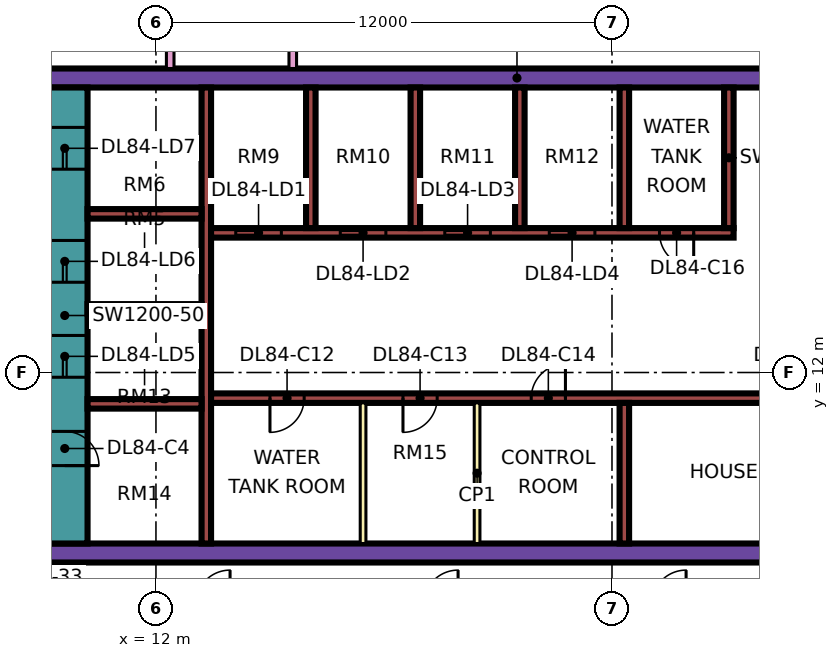
"""IFC4 building model, lengths in metres.
Left out: names, types, materials, properties, quantities, classifications, styles, units other than length and angle.
Written with IfcOpenShell. Run it as: python <this file> out.ifc"""

import sys

from ifc_helpers import new_model, si_unit, direction, frame, frame_2d, origin, place, context, subcontext, project, spatial, rectangle, extrude, element, fill, save


model = new_model("IFC4")
c1 = context("Model", 3, precision=1e-05, world=origin(), true_north=direction((0.0, 1.0)))
c2 = subcontext(c1, "Body", "Model", "MODEL_VIEW")
j1 = project(units=[si_unit("LENGTHUNIT", "METRE"), si_unit("PLANEANGLEUNIT", "RADIAN")], contexts=[c1])
p1 = place(None, origin())
s1 = spatial("IfcSite", under=j1, at=p1, CompositionType="ELEMENT")
p2 = place(p1, origin())
s2 = spatial("IfcBuilding", under=s1, at=p2, CompositionType="ELEMENT")
p3 = place(p2, frame((0.0, 0.0, 361.4)))
s3 = spatial("IfcBuildingStorey", under=s2, at=p3, CompositionType="ELEMENT", Elevation=361.4)
p4 = place(p3, frame((9.0, 7.25, 0.0), z_axis=(0.0, 0.0, 1.0), x_axis=(1.0, 0.0, 0.0)))
e1 = element("IfcWall", 1, at=p4, inside=s3, PredefinedType="SHEAR", context=c2, shape_type="SweptSolid", body=[
    extrude(rectangle(XDim=25.0, YDim=0.5, at=frame_2d((12.5, 0.0))), origin(), (0.0, 0.0, 1.0), 3.75),
])
p5 = place(p3, frame((9.0, 19.75, 0.0), z_axis=(0.0, 0.0, 1.0), x_axis=(1.0, 0.0, 0.0)))
e2 = element("IfcWall", 2, at=p5, inside=s3, PredefinedType="SHEAR", context=c2, shape_type="SweptSolid", body=[
    extrude(rectangle(XDim=25.0, YDim=0.5, at=frame_2d((12.5, 0.0))), origin(), (0.0, 0.0, 1.0), 3.75),
])
p6 = place(p5, frame((19.1, 0.0, 0.0)))
e3 = element("IfcOpeningElement", 3, at=p6, cuts=e2, PredefinedType="OPENING", context=c2, shape_type="SweptSolid", body=[
    extrude(rectangle(XDim=1.8, YDim=2.4, at=frame_2d((0.9, 1.2))), frame((0.0, 0.26, 0.0), z_axis=(0.0, -1.0, 0.0), x_axis=(1.0, 0.0, 0.0)), (0.0, 0.0, 1.0), 0.52),
])
p7 = place(p3, frame((9.6, 7.5, 0.0), z_axis=(0.0, 0.0, 1.0), x_axis=(0.0, 1.0, 0.0)))
e4 = element("IfcWall", 4, at=p7, inside=s3, PredefinedType="SHEAR", context=c2, shape_type="SweptSolid", body=[
    extrude(rectangle(XDim=12.0, YDim=1.2, at=frame_2d((6.0, 0.0))), origin(), (0.0, 0.0, 1.0), 3.75),
])
p8 = place(p7, frame((4.375, 0.0, 0.0)))
e5 = element("IfcOpeningElement", 5, at=p8, cuts=e4, PredefinedType="OPENING", context=c2, shape_type="SweptSolid", body=[
    extrude(rectangle(XDim=1.1, YDim=2.2, at=frame_2d((0.55, 1.1))), frame((0.0, 0.61, 0.0), z_axis=(0.0, -1.0, 0.0), x_axis=(1.0, 0.0, 0.0)), (0.0, 0.0, 1.0), 1.22),
])
p9 = place(p7, frame((6.875, 0.0, 0.0)))
e6 = element("IfcOpeningElement", 6, at=p9, cuts=e4, PredefinedType="OPENING", context=c2, shape_type="SweptSolid", body=[
    extrude(rectangle(XDim=1.1, YDim=2.2, at=frame_2d((0.55, 1.1))), frame((0.0, 0.61, 0.0), z_axis=(0.0, -1.0, 0.0), x_axis=(1.0, 0.0, 0.0)), (0.0, 0.0, 1.0), 1.22),
])
p10 = place(p7, frame((9.85, 0.0, 0.0)))
e7 = element("IfcOpeningElement", 7, at=p10, cuts=e4, PredefinedType="OPENING", context=c2, shape_type="SweptSolid", body=[
    extrude(rectangle(XDim=1.1, YDim=2.2, at=frame_2d((0.55, 1.1))), frame((0.0, 0.61, 0.0), z_axis=(0.0, -1.0, 0.0), x_axis=(1.0, 0.0, 0.0)), (0.0, 0.0, 1.0), 1.22),
])
p11 = place(p7, frame((2.05, 0.0, 0.0)))
e8 = element("IfcOpeningElement", 8, at=p11, cuts=e4, PredefinedType="OPENING", context=c2, shape_type="SweptSolid", body=[
    extrude(rectangle(XDim=0.9, YDim=2.1, at=frame_2d((0.45, 1.05))), frame((0.0, 0.61, 0.0), z_axis=(0.0, -1.0, 0.0), x_axis=(1.0, 0.0, 0.0)), (0.0, 0.0, 1.0), 1.22),
])
p12 = place(p3, frame((13.325, 7.5, 0.0), z_axis=(0.0, 0.0, 1.0), x_axis=(0.0, 1.0, 0.0)))
e9 = element("IfcWall", 9, at=p12, inside=s3, PredefinedType="SHEAR", context=c2, shape_type="SweptSolid", body=[
    extrude(rectangle(XDim=12.0, YDim=0.25, at=frame_2d((6.0, 0.0))), origin(), (0.0, 0.0, 1.0), 3.75),
])
p13 = place(p3, frame((13.45, 11.325, 0.0), z_axis=(0.0, 0.0, 1.0), x_axis=(1.0, 0.0, 0.0)))
e10 = element("IfcWall", 10, at=p13, inside=s3, PredefinedType="SHEAR", context=c2, shape_type="SweptSolid", body=[
    extrude(rectangle(XDim=20.05, YDim=0.25, at=frame_2d((10.025, 0.0))), origin(), (0.0, 0.0, 1.0), 3.75),
])
p14 = place(p13, frame((1.55, 0.0, 0.0)))
e11 = element("IfcOpeningElement", 11, at=p14, cuts=e10, PredefinedType="OPENING", context=c2, shape_type="SweptSolid", body=[
    extrude(rectangle(XDim=0.9, YDim=2.1, at=frame_2d((0.45, 1.05))), frame((0.0, 0.135, 0.0), z_axis=(0.0, -1.0, 0.0), x_axis=(1.0, 0.0, 0.0)), (0.0, 0.0, 1.0), 0.27),
])
p15 = place(p13, frame((5.05, 0.0, 0.0)))
e12 = element("IfcOpeningElement", 12, at=p15, cuts=e10, PredefinedType="OPENING", context=c2, shape_type="SweptSolid", body=[
    extrude(rectangle(XDim=0.9, YDim=2.1, at=frame_2d((0.45, 1.05))), frame((0.0, 0.135, 0.0), z_axis=(0.0, -1.0, 0.0), x_axis=(1.0, 0.0, 0.0)), (0.0, 0.0, 1.0), 0.27),
])
p16 = place(p13, frame((8.425, 0.0, 0.0)))
e13 = element("IfcOpeningElement", 13, at=p16, cuts=e10, PredefinedType="OPENING", context=c2, shape_type="SweptSolid", body=[
    extrude(rectangle(XDim=0.9, YDim=2.1, at=frame_2d((0.45, 1.05))), frame((0.0, 0.135, 0.0), z_axis=(0.0, -1.0, 0.0), x_axis=(1.0, 0.0, 0.0)), (0.0, 0.0, 1.0), 0.27),
])
p17 = place(p13, frame((15.075, 0.0, 0.0)))
e14 = element("IfcOpeningElement", 14, at=p17, cuts=e10, PredefinedType="OPENING", context=c2, shape_type="SweptSolid", body=[
    extrude(rectangle(XDim=0.9, YDim=2.1, at=frame_2d((0.45, 1.05))), frame((0.0, 0.135, 0.0), z_axis=(0.0, -1.0, 0.0), x_axis=(1.0, 0.0, 0.0)), (0.0, 0.0, 1.0), 0.27),
])
p18 = place(p3, frame((13.45, 15.675, 0.0), z_axis=(0.0, 0.0, 1.0), x_axis=(1.0, 0.0, 0.0)))
e15 = element("IfcWall", 15, at=p18, inside=s3, PredefinedType="SHEAR", context=c2, shape_type="SweptSolid", body=[
    extrude(rectangle(XDim=13.75, YDim=0.25, at=frame_2d((6.875, 0.0))), origin(), (0.0, 0.0, 1.0), 3.75),
])
p19 = place(p18, frame((0.65, 0.0, 0.0)))
e16 = element("IfcOpeningElement", 16, at=p19, cuts=e15, PredefinedType="OPENING", context=c2, shape_type="SweptSolid", body=[
    extrude(rectangle(XDim=1.2, YDim=2.2, at=frame_2d((0.6, 1.1))), frame((0.0, 0.135, 0.0), z_axis=(0.0, -1.0, 0.0), x_axis=(1.0, 0.0, 0.0)), (0.0, 0.0, 1.0), 0.27),
])
p20 = place(p18, frame((3.4, 0.0, 0.0)))
e17 = element("IfcOpeningElement", 17, at=p20, cuts=e15, PredefinedType="OPENING", context=c2, shape_type="SweptSolid", body=[
    extrude(rectangle(XDim=1.2, YDim=2.2, at=frame_2d((0.6, 1.1))), frame((0.0, 0.135, 0.0), z_axis=(0.0, -1.0, 0.0), x_axis=(1.0, 0.0, 0.0)), (0.0, 0.0, 1.0), 0.27),
])
p21 = place(p18, frame((6.15, 0.0, 0.0)))
e18 = element("IfcOpeningElement", 18, at=p21, cuts=e15, PredefinedType="OPENING", context=c2, shape_type="SweptSolid", body=[
    extrude(rectangle(XDim=1.2, YDim=2.2, at=frame_2d((0.6, 1.1))), frame((0.0, 0.135, 0.0), z_axis=(0.0, -1.0, 0.0), x_axis=(1.0, 0.0, 0.0)), (0.0, 0.0, 1.0), 0.27),
])
p22 = place(p18, frame((8.9, 0.0, 0.0)))
e19 = element("IfcOpeningElement", 19, at=p22, cuts=e15, PredefinedType="OPENING", context=c2, shape_type="SweptSolid", body=[
    extrude(rectangle(XDim=1.2, YDim=2.2, at=frame_2d((0.6, 1.1))), frame((0.0, 0.135, 0.0), z_axis=(0.0, -1.0, 0.0), x_axis=(1.0, 0.0, 0.0)), (0.0, 0.0, 1.0), 0.27),
])
p23 = place(p18, frame((11.8, 0.0, 0.0)))
e20 = element("IfcOpeningElement", 20, at=p23, cuts=e15, PredefinedType="OPENING", context=c2, shape_type="SweptSolid", body=[
    extrude(rectangle(XDim=0.9, YDim=2.1, at=frame_2d((0.45, 1.05))), frame((0.0, 0.135, 0.0), z_axis=(0.0, -1.0, 0.0), x_axis=(1.0, 0.0, 0.0)), (0.0, 0.0, 1.0), 0.27),
])
for number, where, z_axis, x_axis in (
    (21, (10.2, 11.175, 0.0), (0.0, 0.0, 1.0), (1.0, 0.0, 0.0)),
    (22, (10.2, 13.675, 0.0), (0.0, 0.0, 1.0), (1.0, 0.0, 0.0)),
    (23, (10.2, 16.175, 0.0), (0.0, 0.0, 1.0), (1.0, 0.0, 0.0)),
):
    element("IfcWall", number, at=place(p3, frame(where, z_axis=z_axis, x_axis=x_axis)), inside=s3, PredefinedType="SHEAR", context=c2, shape_type="SweptSolid", body=[
        extrude(rectangle(XDim=3.0, YDim=0.25, at=frame_2d((1.5, 0.0))), origin(), (0.0, 0.0, 1.0), 3.75),
    ])
for number, where, z_axis, x_axis in (
    (24, (24.325, 7.5, 0.0), (0.0, 0.0, 1.0), (0.0, 1.0, 0.0)),
    (25, (16.075, 15.8, 0.0), (0.0, 0.0, 1.0), (0.0, 1.0, 0.0)),
    (26, (18.825, 15.8, 0.0), (0.0, 0.0, 1.0), (0.0, 1.0, 0.0)),
    (27, (21.575, 15.8, 0.0), (0.0, 0.0, 1.0), (0.0, 1.0, 0.0)),
    (28, (24.325, 15.8, 0.0), (0.0, 0.0, 1.0), (0.0, 1.0, 0.0)),
    (29, (27.075, 15.8, 0.0), (0.0, 0.0, 1.0), (0.0, 1.0, 0.0)),
):
    element("IfcWall", number, at=place(p3, frame(where, z_axis=z_axis, x_axis=x_axis)), inside=s3, PredefinedType="SHEAR", context=c2, shape_type="SweptSolid", body=[
        extrude(rectangle(XDim=3.7, YDim=0.25, at=frame_2d((1.85, 0.0))), origin(), (0.0, 0.0, 1.0), 3.75),
    ])
p24 = place(p3, frame((-1.447, 12.553, 0.0), z_axis=(0.0, 0.0, 1.0), x_axis=(0.707106781187, -0.707106781187, 0.0)))
e30 = element("IfcWall", 30, at=p24, inside=s3, PredefinedType="SOLIDWALL", context=c2, shape_type="SweptSolid", body=[
    extrude(rectangle(XDim=19.799, YDim=0.15, at=frame_2d((9.899, 0.0))), origin(), (0.0, 0.0, 1.0), 3.35),
])
p25 = place(p24, frame((2.212, 0.0, 0.45)))
e31 = element("IfcOpeningElement", 31, at=p25, cuts=e30, PredefinedType="OPENING", context=c2, shape_type="SweptSolid", body=[
    extrude(rectangle(XDim=3.0, YDim=2.4, at=frame_2d((1.5, 1.2))), frame((0.0, 0.085, 0.0), z_axis=(0.0, -1.0, 0.0), x_axis=(1.0, 0.0, 0.0)), (0.0, 0.0, 1.0), 0.17),
])
p26 = place(p24, frame((10.216, 0.0, 0.45)))
e32 = element("IfcOpeningElement", 32, at=p26, cuts=e30, PredefinedType="OPENING", context=c2, shape_type="SweptSolid", body=[
    extrude(rectangle(XDim=3.0, YDim=2.4, at=frame_2d((1.5, 1.2))), frame((0.0, 0.085, 0.0), z_axis=(0.0, -1.0, 0.0), x_axis=(1.0, 0.0, 0.0)), (0.0, 0.0, 1.0), 0.17),
])
for number, where, z_axis, x_axis in (
    (33, (17.45, 7.5, 0.0), (0.0, 0.0, 1.0), (0.0, 1.0, 0.0)),
    (34, (20.45, 7.5, 0.0), (0.0, 0.0, 1.0), (0.0, 1.0, 0.0)),
):
    element("IfcWall", number, at=place(p3, frame(where, z_axis=z_axis, x_axis=x_axis)), inside=s3, PredefinedType="PARTITIONING", context=c2, shape_type="SweptSolid", body=[
        extrude(rectangle(XDim=3.7, YDim=0.15, at=frame_2d((1.85, 0.0))), origin(), (0.0, 0.0, 1.0), 3.35),
    ])
p27 = place(p3, frame((12.375, 20.0, 0.0), z_axis=(0.0, 0.0, 1.0), x_axis=(0.0, 1.0, 0.0)))
e35 = element("IfcWall", 35, at=p27, inside=s3, PredefinedType="PARTITIONING", context=c2, shape_type="SweptSolid", body=[
    extrude(rectangle(XDim=33.926, YDim=0.2, at=frame_2d((16.963, 0.0))), origin(), (0.0, 0.0, 1.0), 3.35),
])
p28 = place(p27, frame((29.4, 0.0, 0.0)))
e36 = element("IfcOpeningElement", 36, at=p28, cuts=e35, PredefinedType="OPENING", context=c2, shape_type="SweptSolid", body=[
    extrude(rectangle(XDim=1.0, YDim=2.1, at=frame_2d((0.5, 1.05))), frame((0.0, 0.11, 0.0), z_axis=(0.0, -1.0, 0.0), x_axis=(1.0, 0.0, 0.0)), (0.0, 0.0, 1.0), 0.22),
])
p29 = place(p27, frame((0.6, 0.0, 0.0)))
e37 = element("IfcOpeningElement", 37, at=p29, cuts=e35, PredefinedType="OPENING", context=c2, shape_type="SweptSolid", body=[
    extrude(rectangle(XDim=1.2, YDim=2.1, at=frame_2d((0.6, 1.05))), frame((0.0, 0.11, 0.0), z_axis=(0.0, -1.0, 0.0), x_axis=(1.0, 0.0, 0.0)), (0.0, 0.0, 1.0), 0.22),
])
p30 = place(p27, frame((4.5, 0.0, 0.0)))
e38 = element("IfcOpeningElement", 38, at=p30, cuts=e35, PredefinedType="OPENING", context=c2, shape_type="SweptSolid", body=[
    extrude(rectangle(XDim=1.0, YDim=2.1, at=frame_2d((0.5, 1.05))), frame((0.0, 0.11, 0.0), z_axis=(0.0, -1.0, 0.0), x_axis=(1.0, 0.0, 0.0)), (0.0, 0.0, 1.0), 0.22),
])
p31 = place(p3, frame((15.6, 20.0, 0.0), z_axis=(0.0, 0.0, 1.0), x_axis=(0.0, 1.0, 0.0)))
e39 = element("IfcWall", 39, at=p31, inside=s3, PredefinedType="PARTITIONING", context=c2, shape_type="SweptSolid", body=[
    extrude(rectangle(XDim=27.775, YDim=0.2, at=frame_2d((13.887, 0.0))), origin(), (0.0, 0.0, 1.0), 3.35),
])
p32 = place(p31, frame((7.15, 0.0, 0.0)))
e40 = element("IfcOpeningElement", 40, at=p32, cuts=e39, PredefinedType="OPENING", context=c2, shape_type="SweptSolid", body=[
    extrude(rectangle(XDim=1.6, YDim=2.1, at=frame_2d((0.8, 1.05))), frame((0.0, 0.11, 0.0), z_axis=(0.0, -1.0, 0.0), x_axis=(1.0, 0.0, 0.0)), (0.0, 0.0, 1.0), 0.22),
])
p33 = place(p31, frame((13.5, 0.0, 0.0)))
e41 = element("IfcOpeningElement", 41, at=p33, cuts=e39, PredefinedType="OPENING", context=c2, shape_type="SweptSolid", body=[
    extrude(rectangle(XDim=1.0, YDim=2.1, at=frame_2d((0.5, 1.05))), frame((0.0, 0.11, 0.0), z_axis=(0.0, -1.0, 0.0), x_axis=(1.0, 0.0, 0.0)), (0.0, 0.0, 1.0), 0.22),
])
p34 = place(p31, frame((17.05, 0.0, 0.0)))
e42 = element("IfcOpeningElement", 42, at=p34, cuts=e39, PredefinedType="OPENING", context=c2, shape_type="SweptSolid", body=[
    extrude(rectangle(XDim=1.0, YDim=2.1, at=frame_2d((0.5, 1.05))), frame((0.0, 0.11, 0.0), z_axis=(0.0, -1.0, 0.0), x_axis=(1.0, 0.0, 0.0)), (0.0, 0.0, 1.0), 0.22),
])
p35 = place(p31, frame((1.15, 0.0, 0.0)))
e43 = element("IfcOpeningElement", 43, at=p35, cuts=e39, PredefinedType="OPENING", context=c2, shape_type="SweptSolid", body=[
    extrude(rectangle(XDim=1.8, YDim=2.1, at=frame_2d((0.9, 1.05))), frame((0.0, 0.11, 0.0), z_axis=(0.0, -1.0, 0.0), x_axis=(1.0, 0.0, 0.0)), (0.0, 0.0, 1.0), 0.22),
])
p36 = place(p31, frame((25.9, 0.0, 0.0)))
e44 = element("IfcOpeningElement", 44, at=p36, cuts=e39, PredefinedType="OPENING", context=c2, shape_type="SweptSolid", body=[
    extrude(rectangle(XDim=1.0, YDim=2.1, at=frame_2d((0.5, 1.05))), frame((0.0, 0.11, 0.0), z_axis=(0.0, -1.0, 0.0), x_axis=(1.0, 0.0, 0.0)), (0.0, 0.0, 1.0), 0.22),
])
p37 = place(p19, origin())
e45 = element("IfcDoor", 45, at=p37, inside=s3, OperationType="DOUBLE_DOOR_SLIDING", PredefinedType="DOOR", context=c2, shape_type="SweptSolid", body=[
    extrude(rectangle(XDim=1.2, YDim=2.2, at=frame_2d((0.6, 1.1))), frame((0.0, 0.025, 0.0), z_axis=(0.0, -1.0, 0.0), x_axis=(1.0, 0.0, 0.0)), (0.0, 0.0, 1.0), 0.05),
])
fill(e16, e45)
p38 = place(p20, origin())
e46 = element("IfcDoor", 46, at=p38, inside=s3, OperationType="DOUBLE_DOOR_SLIDING", PredefinedType="DOOR", context=c2, shape_type="SweptSolid", body=[
    extrude(rectangle(XDim=1.2, YDim=2.2, at=frame_2d((0.6, 1.1))), frame((0.0, 0.025, 0.0), z_axis=(0.0, -1.0, 0.0), x_axis=(1.0, 0.0, 0.0)), (0.0, 0.0, 1.0), 0.05),
])
fill(e17, e46)
p39 = place(p21, origin())
e47 = element("IfcDoor", 47, at=p39, inside=s3, OperationType="DOUBLE_DOOR_SLIDING", PredefinedType="DOOR", context=c2, shape_type="SweptSolid", body=[
    extrude(rectangle(XDim=1.2, YDim=2.2, at=frame_2d((0.6, 1.1))), frame((0.0, 0.025, 0.0), z_axis=(0.0, -1.0, 0.0), x_axis=(1.0, 0.0, 0.0)), (0.0, 0.0, 1.0), 0.05),
])
fill(e18, e47)
p40 = place(p22, origin())
e48 = element("IfcDoor", 48, at=p40, inside=s3, OperationType="DOUBLE_DOOR_SLIDING", PredefinedType="DOOR", context=c2, shape_type="SweptSolid", body=[
    extrude(rectangle(XDim=1.2, YDim=2.2, at=frame_2d((0.6, 1.1))), frame((0.0, 0.025, 0.0), z_axis=(0.0, -1.0, 0.0), x_axis=(1.0, 0.0, 0.0)), (0.0, 0.0, 1.0), 0.05),
])
fill(e19, e48)
p41 = place(p8, origin())
e49 = element("IfcDoor", 49, at=p41, inside=s3, OperationType="DOUBLE_DOOR_SLIDING", PredefinedType="DOOR", context=c2, shape_type="SweptSolid", body=[
    extrude(rectangle(XDim=1.1, YDim=2.2, at=frame_2d((0.55, 1.1))), frame((0.0, 0.025, 0.0), z_axis=(0.0, -1.0, 0.0), x_axis=(1.0, 0.0, 0.0)), (0.0, 0.0, 1.0), 0.05),
])
fill(e5, e49)
p42 = place(p9, origin())
e50 = element("IfcDoor", 50, at=p42, inside=s3, OperationType="DOUBLE_DOOR_SLIDING", PredefinedType="DOOR", context=c2, shape_type="SweptSolid", body=[
    extrude(rectangle(XDim=1.1, YDim=2.2, at=frame_2d((0.55, 1.1))), frame((0.0, 0.025, 0.0), z_axis=(0.0, -1.0, 0.0), x_axis=(1.0, 0.0, 0.0)), (0.0, 0.0, 1.0), 0.05),
])
fill(e6, e50)
p43 = place(p10, origin())
e51 = element("IfcDoor", 51, at=p43, inside=s3, OperationType="DOUBLE_DOOR_SLIDING", PredefinedType="DOOR", context=c2, shape_type="SweptSolid", body=[
    extrude(rectangle(XDim=1.1, YDim=2.2, at=frame_2d((0.55, 1.1))), frame((0.0, 0.025, 0.0), z_axis=(0.0, -1.0, 0.0), x_axis=(1.0, 0.0, 0.0)), (0.0, 0.0, 1.0), 0.05),
])
fill(e7, e51)
p44 = place(p11, frame((0.9, 0.0, 0.0), z_axis=(0.0, 0.0, 1.0), x_axis=(-1.0, 0.0, 0.0)))
e52 = element("IfcDoor", 52, at=p44, inside=s3, OperationType="SINGLE_SWING_LEFT", PredefinedType="DOOR", context=c2, shape_type="SweptSolid", body=[
    extrude(rectangle(XDim=0.9, YDim=2.1, at=frame_2d((0.45, 1.05))), frame((0.0, 0.025, 0.0), z_axis=(0.0, -1.0, 0.0), x_axis=(1.0, 0.0, 0.0)), (0.0, 0.0, 1.0), 0.05),
])
fill(e8, e52)
p45 = place(p14, frame((0.9, 0.0, 0.0), z_axis=(0.0, 0.0, 1.0), x_axis=(-1.0, 0.0, 0.0)))
e53 = element("IfcDoor", 53, at=p45, inside=s3, OperationType="SINGLE_SWING_LEFT", PredefinedType="DOOR", context=c2, shape_type="SweptSolid", body=[
    extrude(rectangle(XDim=0.9, YDim=2.1, at=frame_2d((0.45, 1.05))), frame((0.0, 0.025, 0.0), z_axis=(0.0, -1.0, 0.0), x_axis=(1.0, 0.0, 0.0)), (0.0, 0.0, 1.0), 0.05),
])
fill(e11, e53)
p46 = place(p15, frame((0.9, 0.0, 0.0), z_axis=(0.0, 0.0, 1.0), x_axis=(-1.0, 0.0, 0.0)))
e54 = element("IfcDoor", 54, at=p46, inside=s3, OperationType="SINGLE_SWING_LEFT", PredefinedType="DOOR", context=c2, shape_type="SweptSolid", body=[
    extrude(rectangle(XDim=0.9, YDim=2.1, at=frame_2d((0.45, 1.05))), frame((0.0, 0.025, 0.0), z_axis=(0.0, -1.0, 0.0), x_axis=(1.0, 0.0, 0.0)), (0.0, 0.0, 1.0), 0.05),
])
fill(e12, e54)
p47 = place(p16, frame((0.9, 0.0, 0.0), z_axis=(0.0, 0.0, 1.0), x_axis=(-1.0, 0.0, 0.0)))
e55 = element("IfcDoor", 55, at=p47, inside=s3, OperationType="SINGLE_SWING_RIGHT", PredefinedType="DOOR", context=c2, shape_type="SweptSolid", body=[
    extrude(rectangle(XDim=0.9, YDim=2.1, at=frame_2d((0.45, 1.05))), frame((0.0, 0.025, 0.0), z_axis=(0.0, -1.0, 0.0), x_axis=(1.0, 0.0, 0.0)), (0.0, 0.0, 1.0), 0.05),
])
fill(e13, e55)
p48 = place(p23, origin())
e56 = element("IfcDoor", 56, at=p48, inside=s3, OperationType="SINGLE_SWING_RIGHT", PredefinedType="DOOR", context=c2, shape_type="SweptSolid", body=[
    extrude(rectangle(XDim=0.9, YDim=2.1, at=frame_2d((0.45, 1.05))), frame((0.0, 0.025, 0.0), z_axis=(0.0, -1.0, 0.0), x_axis=(1.0, 0.0, 0.0)), (0.0, 0.0, 1.0), 0.05),
])
fill(e20, e56)
save(model, sys.argv[1])
